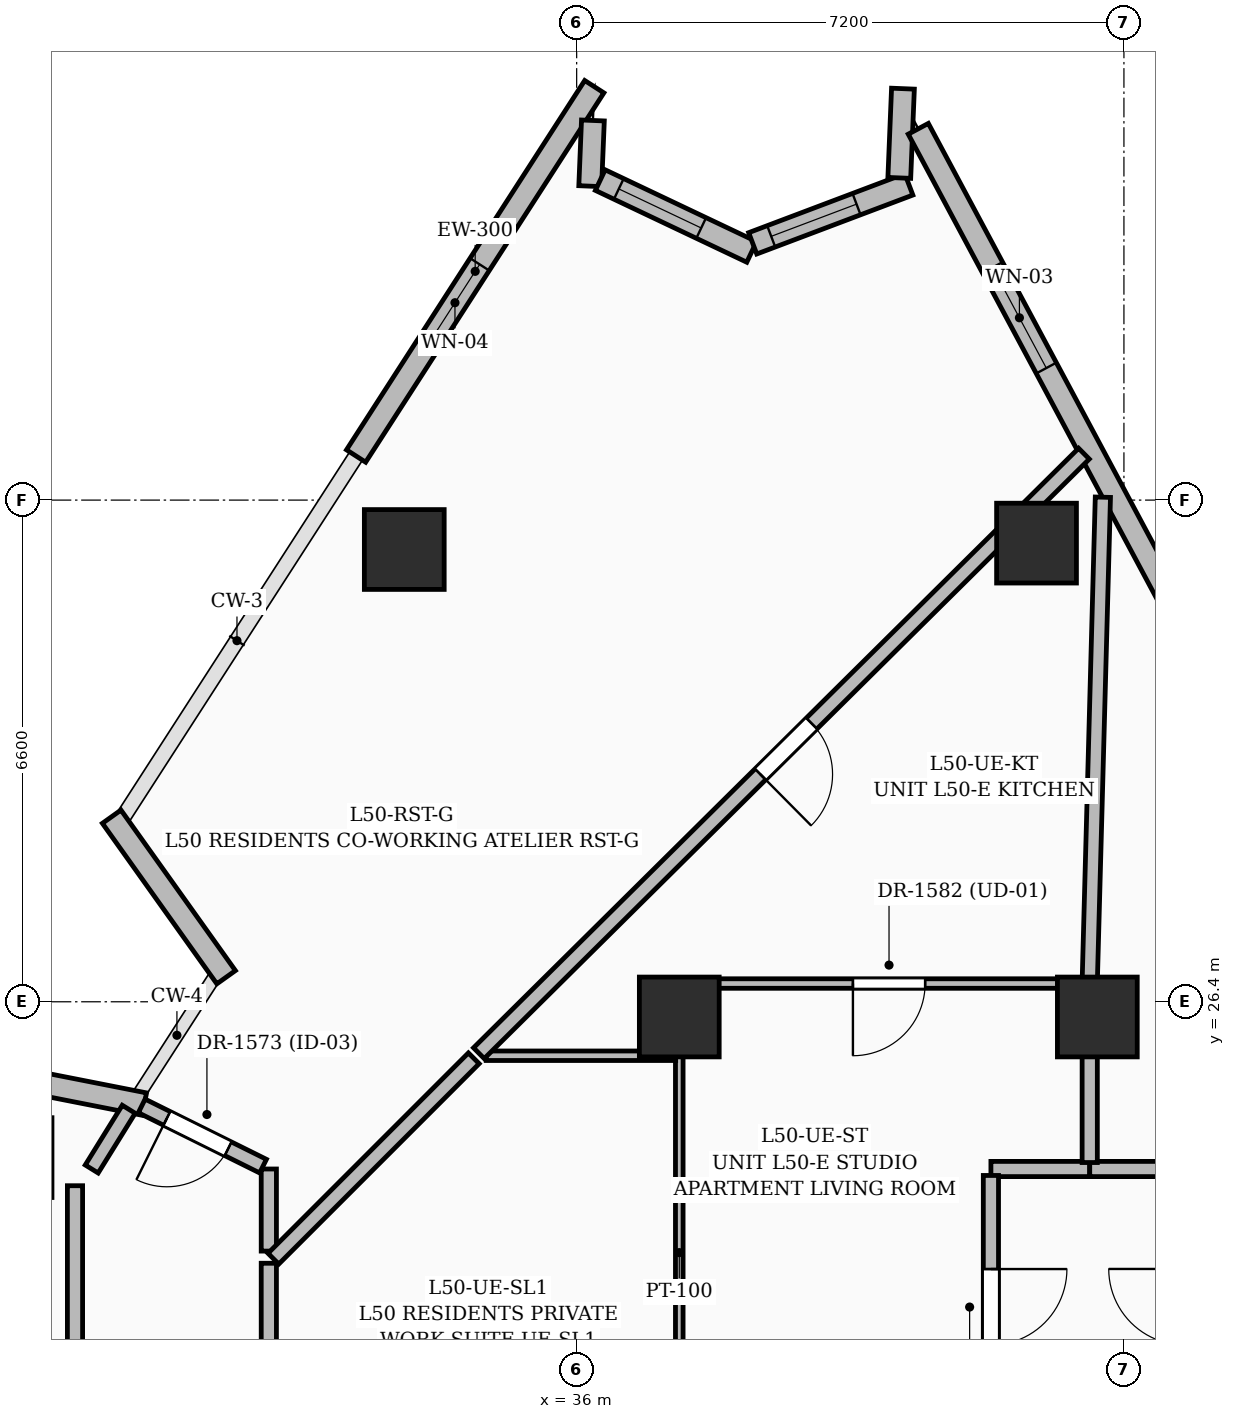
"""IFC4 building model, lengths in metres.
Left out: names, types, materials, properties, quantities, classifications, styles, units other than length and angle.
Written with IfcOpenShell. Run it as: python <this file> out.ifc"""

import sys

from ifc_helpers import new_model, si_unit, direction, frame, frame_2d, origin, origin_2d, place, context, subcontext, project, spatial, rectangle, extrude, element, fill, save


model = new_model("IFC4")
c1 = context("Model", 3, precision=1e-05, world=origin(), true_north=direction((0.0, 1.0)))
c2 = subcontext(c1, "Body", "Model", "MODEL_VIEW")
j1 = project(units=[si_unit("LENGTHUNIT", "METRE"), si_unit("PLANEANGLEUNIT", "RADIAN")], contexts=[c1])
p1 = place(None, origin())
s1 = spatial("IfcSite", under=j1, at=p1, CompositionType="ELEMENT")
p2 = place(p1, origin())
s2 = spatial("IfcBuilding", under=s1, at=p2, CompositionType="ELEMENT")
p3 = place(p2, frame((0.0, 0.0, 193.2)))
s3 = spatial("IfcBuildingStorey", under=s2, at=p3, CompositionType="ELEMENT", Elevation=193.2)
for number, where, z_axis, x_axis in (
    (1, (42.85, 26.2, 0.0), (0.0, 0.0, 1.0), (1.0, 0.0, 0.0)),
    (2, (37.35, 26.2, 0.0), (0.0, 0.0, 1.0), (1.0, 0.0, 0.0)),
    (3, (42.05, 32.434, 0.0), (0.0, 0.0, 1.0), (1.0, 0.0, 0.0)),
    (4, (33.732, 32.35, 0.0), (0.0, 0.0, 1.0), (1.0, 0.0, 0.0)),
):
    element("IfcColumn", number, at=place(p3, frame(where, z_axis=z_axis, x_axis=x_axis)), inside=s3, PredefinedType="COLUMN", context=c2, shape_type="SweptSolid", body=[
        extrude(rectangle(XDim=1.05, YDim=1.05, at=origin_2d()), origin(), (0.0, 0.0, 1.0), 3.6),
    ])
p4 = place(p3, frame((27.767, 25.555, 0.0), z_axis=(0.0, 0.0, 1.0), x_axis=(0.981183938234, -0.193075320412, 0.0)))
e5 = element("IfcWall", 5, at=p4, inside=s3, PredefinedType="SOLIDWALL", context=c2, shape_type="SweptSolid", body=[
    extrude(rectangle(XDim=2.595, YDim=0.3, at=frame_2d((1.297, 0.0))), origin(), (0.0, 0.0, 1.0), 2.525),
])
p5 = place(p3, frame((31.388, 26.723, 0.0), z_axis=(0.0, 0.0, 1.0), x_axis=(-0.580409797139, 0.814324546716, 0.0)))
e6 = element("IfcWall", 6, at=p5, inside=s3, PredefinedType="SOLIDWALL", context=c2, shape_type="SweptSolid", body=[
    extrude(rectangle(XDim=2.594, YDim=0.3, at=frame_2d((1.297, 0.0))), origin(), (0.0, 0.0, 1.0), 2.525),
])
p6 = place(p3, frame((33.098, 33.58, 0.0), z_axis=(0.0, 0.0, 1.0), x_axis=(0.542037422538, 0.840354349408, 0.0)))
e7 = element("IfcWall", 7, at=p6, inside=s3, PredefinedType="SOLIDWALL", context=c2, shape_type="SweptSolid", body=[
    extrude(rectangle(XDim=5.782, YDim=0.3, at=frame_2d((2.891, 0.0))), origin(), (0.0, 0.0, 1.0), 3.3),
])
p7 = place(p6, frame((1.8, 0.0, 0.8)))
e8 = element("IfcOpeningElement", 8, at=p7, cuts=e7, PredefinedType="OPENING", context=c2, shape_type="SweptSolid", body=[
    extrude(rectangle(XDim=1.2, YDim=1.8, at=frame_2d((0.6, 0.9))), frame((0.0, 0.16, 0.0), z_axis=(0.0, -1.0, 0.0), x_axis=(1.0, 0.0, 0.0)), (0.0, 0.0, 1.0), 0.32),
])
p8 = place(p3, frame((36.214, 37.994, 0.0), z_axis=(0.0, 0.0, 1.0), x_axis=(-0.040926134278, -0.999162174791, 0.0)))
e9 = element("IfcWall", 9, at=p8, inside=s3, PredefinedType="SOLIDWALL", context=c2, shape_type="SweptSolid", body=[
    extrude(rectangle(XDim=0.865, YDim=0.3, at=frame_2d((0.433, 0.0))), origin(), (0.0, 0.0, 1.0), 3.3),
])
p9 = place(p3, frame((36.311, 37.21, 0.0), z_axis=(0.0, 0.0, 1.0), x_axis=(0.903471604204, -0.428647944585, 0.0)))
e10 = element("IfcWall", 10, at=p9, inside=s3, PredefinedType="SOLIDWALL", context=c2, shape_type="SweptSolid", body=[
    extrude(rectangle(XDim=2.205, YDim=0.3, at=frame_2d((1.103, 0.0))), origin(), (0.0, 0.0, 1.0), 3.3),
])
p10 = place(p9, frame((0.27, 0.0, 0.8)))
e11 = element("IfcOpeningElement", 11, at=p10, cuts=e10, PredefinedType="OPENING", context=c2, shape_type="SweptSolid", body=[
    extrude(rectangle(XDim=1.2, YDim=1.8, at=frame_2d((0.6, 0.9))), frame((0.0, 0.16, 0.0), z_axis=(0.0, -1.0, 0.0), x_axis=(1.0, 0.0, 0.0)), (0.0, 0.0, 1.0), 0.32),
])
p11 = place(p3, frame((38.316, 36.378, 0.0), z_axis=(0.0, 0.0, 1.0), x_axis=(0.935503953589, 0.353316222129, 0.0)))
e12 = element("IfcWall", 12, at=p11, inside=s3, PredefinedType="SOLIDWALL", context=c2, shape_type="SweptSolid", body=[
    extrude(rectangle(XDim=2.195, YDim=0.3, at=frame_2d((1.098, 0.0))), origin(), (0.0, 0.0, 1.0), 3.3),
])
p12 = place(p11, frame((0.26, 0.0, 0.8)))
e13 = element("IfcOpeningElement", 13, at=p12, cuts=e12, PredefinedType="OPENING", context=c2, shape_type="SweptSolid", body=[
    extrude(rectangle(XDim=1.2, YDim=1.8, at=frame_2d((0.6, 0.9))), frame((0.0, 0.16, 0.0), z_axis=(0.0, -1.0, 0.0), x_axis=(1.0, 0.0, 0.0)), (0.0, 0.0, 1.0), 0.32),
])
p13 = place(p3, frame((40.245, 37.239, 0.0), z_axis=(0.0, 0.0, 1.0), x_axis=(0.040939027533, 0.999161646594, 0.0)))
e14 = element("IfcWall", 14, at=p13, inside=s3, PredefinedType="SOLIDWALL", context=c2, shape_type="SweptSolid", body=[
    extrude(rectangle(XDim=1.175, YDim=0.3, at=frame_2d((0.587, 0.0))), origin(), (0.0, 0.0, 1.0), 3.3),
])
p14 = place(p3, frame((40.495, 37.885, 0.0), z_axis=(0.0, 0.0, 1.0), x_axis=(0.471731834897, -0.88174206883, 0.0)))
e15 = element("IfcWall", 15, at=p14, inside=s3, PredefinedType="SOLIDWALL", context=c2, shape_type="SweptSolid", body=[
    extrude(rectangle(XDim=7.1, YDim=0.3, at=frame_2d((3.55, 0.0))), origin(), (0.0, 0.0, 1.0), 3.3),
])
p15 = place(p14, frame((2.07, 0.0, 0.6)))
e16 = element("IfcOpeningElement", 16, at=p15, cuts=e15, PredefinedType="OPENING", context=c2, shape_type="SweptSolid", body=[
    extrude(rectangle(XDim=1.5, YDim=2.1, at=frame_2d((0.75, 1.05))), frame((0.0, 0.16, 0.0), z_axis=(0.0, -1.0, 0.0), x_axis=(1.0, 0.0, 0.0)), (0.0, 0.0, 1.0), 0.32),
])
p16 = place(p3, frame((29.4, 23.98, 0.0), z_axis=(0.0, 0.0, 1.0), x_axis=(0.0, -1.0, 0.0)))
e17 = element("IfcWall", 17, at=p16, inside=s3, PredefinedType="PARTITIONING", context=c2, shape_type="SweptSolid", body=[
    extrude(rectangle(XDim=3.18, YDim=0.2, at=frame_2d((1.59, 0.0))), origin(), (0.0, 0.0, 1.0), 2.414),
])
p17 = place(p3, frame((30.107, 24.986, 0.0), z_axis=(0.0, 0.0, 1.0), x_axis=(-0.526481863985, -0.850186360097, 0.0)))
e18 = element("IfcWall", 18, at=p17, inside=s3, PredefinedType="PARTITIONING", context=c2, shape_type="SweptSolid", body=[
    extrude(rectangle(XDim=0.925, YDim=0.2, at=frame_2d((0.462, 0.0))), origin(), (0.0, 0.0, 1.0), 3.3),
])
p18 = place(p3, frame((42.75, 24.2, 0.0), z_axis=(0.0, 0.0, 1.0), x_axis=(-1.0, 0.0, 0.0)))
e19 = element("IfcWall", 19, at=p18, inside=s3, PredefinedType="PARTITIONING", context=c2, shape_type="SweptSolid", body=[
    extrude(rectangle(XDim=1.3, YDim=0.2, at=frame_2d((0.65, 0.0))), origin(), (0.0, 0.0, 1.0), 3.3),
])
p19 = place(p3, frame((41.45, 24.115, 0.0), z_axis=(0.0, 0.0, 1.0), x_axis=(0.0, -1.0, 0.0)))
e20 = element("IfcWall", 20, at=p19, inside=s3, PredefinedType="PARTITIONING", context=c2, shape_type="SweptSolid", body=[
    extrude(rectangle(XDim=3.665, YDim=0.2, at=frame_2d((1.833, 0.0))), origin(), (0.0, 0.0, 1.0), 3.3),
])
p20 = place(p19, frame((1.231, 0.0, 0.0)))
e21 = element("IfcOpeningElement", 21, at=p20, cuts=e20, PredefinedType="OPENING", context=c2, shape_type="SweptSolid", body=[
    extrude(rectangle(XDim=1.0, YDim=2.2, at=frame_2d((0.5, 1.1))), frame((0.0, 0.11, 0.0), z_axis=(0.0, -1.0, 0.0), x_axis=(1.0, 0.0, 0.0)), (0.0, 0.0, 1.0), 0.22),
])
p21 = place(p3, frame((31.95, 19.42, 0.0), z_axis=(0.0, 0.0, 1.0), x_axis=(0.0, 1.0, 0.0)))
e22 = element("IfcWall", 22, at=p21, inside=s3, PredefinedType="PARTITIONING", context=c2, shape_type="SweptSolid", body=[
    extrude(rectangle(XDim=3.54, YDim=0.2, at=frame_2d((1.77, 0.0))), origin(), (0.0, 0.0, 1.0), 2.414),
])
p22 = place(p3, frame((43.915, 24.2, 0.0), z_axis=(0.0, 0.0, 1.0), x_axis=(-1.0, 0.0, 0.0)))
e23 = element("IfcWall", 23, at=p22, inside=s3, PredefinedType="PARTITIONING", context=c2, shape_type="SweptSolid", body=[
    extrude(rectangle(XDim=1.165, YDim=0.2, at=frame_2d((0.583, 0.0))), origin(), (0.0, 0.0, 1.0), 2.386),
])
p23 = place(p3, frame((31.95, 23.12, 0.0), z_axis=(0.0, 0.0, 1.0), x_axis=(0.0, 1.0, 0.0)))
e24 = element("IfcWall", 24, at=p23, inside=s3, PredefinedType="PARTITIONING", context=c2, shape_type="SweptSolid", body=[
    extrude(rectangle(XDim=1.08, YDim=0.2, at=frame_2d((0.54, 0.0))), origin(), (0.0, 0.0, 1.0), 2.721),
])
p24 = place(p3, frame((31.874, 24.238, 0.0), z_axis=(0.0, 0.0, 1.0), x_axis=(-0.895738971374, 0.444580358497, 0.0)))
e25 = element("IfcWall", 25, at=p24, inside=s3, PredefinedType="PARTITIONING", context=c2, shape_type="SweptSolid", body=[
    extrude(rectangle(XDim=1.781, YDim=0.2, at=frame_2d((0.891, 0.0))), origin(), (0.0, 0.0, 1.0), 3.3),
])
p25 = place(p24, frame((0.513, 0.0, 0.0)))
e26 = element("IfcOpeningElement", 26, at=p25, cuts=e25, PredefinedType="OPENING", context=c2, shape_type="SweptSolid", body=[
    extrude(rectangle(XDim=0.9, YDim=2.1, at=frame_2d((0.45, 1.05))), frame((0.0, 0.11, 0.0), z_axis=(0.0, -1.0, 0.0), x_axis=(1.0, 0.0, 0.0)), (0.0, 0.0, 1.0), 0.22),
])
p26 = place(p3, frame((42.75, 26.64, 0.0), z_axis=(0.0, 0.0, 1.0), x_axis=(-1.0, 0.0, 0.0)))
e27 = element("IfcWall", 27, at=p26, inside=s3, PredefinedType="PARTITIONING", context=c2, shape_type="SweptSolid", body=[
    extrude(rectangle(XDim=5.4, YDim=0.125, at=frame_2d((2.7, 0.0))), origin(), (0.0, 0.0, 1.0), 3.3),
])
p27 = place(p26, frame((2.165, 0.0, 0.0)))
e28 = element("IfcOpeningElement", 28, at=p27, cuts=e27, PredefinedType="OPENING", context=c2, shape_type="SweptSolid", body=[
    extrude(rectangle(XDim=0.95, YDim=2.2, at=frame_2d((0.475, 1.1))), frame((0.0, 0.072, 0.0), z_axis=(0.0, -1.0, 0.0), x_axis=(1.0, 0.0, 0.0)), (0.0, 0.0, 1.0), 0.145),
])
p28 = place(p3, frame((37.35, 26.593, 0.0), z_axis=(0.0, 0.0, 1.0), x_axis=(0.0, -1.0, 0.0)))
e29 = element("IfcWall", 29, at=p28, inside=s3, PredefinedType="PARTITIONING", context=c2, shape_type="SweptSolid", body=[
    extrude(rectangle(XDim=0.903, YDim=0.125, at=frame_2d((0.451, 0.0))), origin(), (0.0, 0.0, 1.0), 3.3),
])
p29 = place(p3, frame((37.35, 25.69, 0.0), z_axis=(0.0, 0.0, 1.0), x_axis=(0.0, -1.0, 0.0)))
e30 = element("IfcWall", 30, at=p29, inside=s3, PredefinedType="PARTITIONING", context=c2, shape_type="SweptSolid", body=[
    extrude(rectangle(XDim=5.18, YDim=0.1, at=frame_2d((2.59, 0.0))), origin(), (0.0, 0.0, 1.0), 3.3),
])
p30 = place(p3, frame((42.75, 24.285, 0.0), z_axis=(0.0, 0.0, 1.0), x_axis=(0.0, 1.0, 0.0)))
e31 = element("IfcWall", 31, at=p30, inside=s3, PredefinedType="PARTITIONING", context=c2, shape_type="SweptSolid", body=[
    extrude(rectangle(XDim=2.308, YDim=0.2, at=frame_2d((1.154, 0.0))), origin(), (0.0, 0.0, 1.0), 3.3),
])
p31 = place(p3, frame((34.81, 25.69, 0.0), z_axis=(0.0, 0.0, 1.0), x_axis=(1.0, 0.0, 0.0)))
e32 = element("IfcWall", 32, at=p31, inside=s3, PredefinedType="PARTITIONING", context=c2, shape_type="SweptSolid", body=[
    extrude(rectangle(XDim=2.492, YDim=0.125, at=frame_2d((1.246, 0.0))), origin(), (0.0, 0.0, 1.0), 2.386),
])
p32 = place(p3, frame((42.751, 26.688, 0.0), z_axis=(0.0, 0.0, 1.0), x_axis=(0.027092926653, 0.999632919289, 0.0)))
e33 = element("IfcWall", 33, at=p32, inside=s3, PredefinedType="PARTITIONING", context=c2, shape_type="SweptSolid", body=[
    extrude(rectangle(XDim=6.353, YDim=0.2, at=frame_2d((3.177, 0.0))), origin(), (0.0, 0.0, 1.0), 2.414),
])
p33 = place(p3, frame((42.674, 33.611, 0.0), z_axis=(0.0, 0.0, 1.0), x_axis=(-0.710345403642, -0.703853257096, 0.0)))
e34 = element("IfcWall", 34, at=p33, inside=s3, PredefinedType="PARTITIONING", context=c2, shape_type="SweptSolid", body=[
    extrude(rectangle(XDim=11.207, YDim=0.2, at=frame_2d((5.603, 0.0))), origin(), (0.0, 0.0, 1.0), 2.414),
])
p34 = place(p33, frame((5.043, 0.0, 0.0)))
e35 = element("IfcOpeningElement", 35, at=p34, cuts=e34, PredefinedType="OPENING", context=c2, shape_type="SweptSolid", body=[
    extrude(rectangle(XDim=0.95, YDim=2.2, at=frame_2d((0.475, 1.1))), frame((0.0, 0.11, 0.0), z_axis=(0.0, -1.0, 0.0), x_axis=(1.0, 0.0, 0.0)), (0.0, 0.0, 1.0), 0.22),
])
p35 = place(p3, frame((34.646, 25.656, 0.0), z_axis=(0.0, 0.0, 1.0), x_axis=(-0.707106781187, -0.707106781187, 0.0)))
e36 = element("IfcWall", 36, at=p35, inside=s3, PredefinedType="PARTITIONING", context=c2, shape_type="SweptSolid", body=[
    extrude(rectangle(XDim=3.729, YDim=0.2, at=frame_2d((1.864, 0.0))), origin(), (0.0, 0.0, 1.0), 2.721),
])
p36 = place(p7, origin())
e37 = element("IfcWindow", 37, at=p36, inside=s3, PartitioningType="SINGLE_PANEL", PredefinedType="WINDOW", context=c2, shape_type="SweptSolid", body=[
    extrude(rectangle(XDim=1.2, YDim=1.8, at=frame_2d((0.6, 0.9))), frame((0.0, 0.03, 0.0), z_axis=(0.0, -1.0, 0.0), x_axis=(1.0, 0.0, 0.0)), (0.0, 0.0, 1.0), 0.06),
])
fill(e8, e37)
p37 = place(p10, origin())
e38 = element("IfcWindow", 38, at=p37, inside=s3, PartitioningType="SINGLE_PANEL", PredefinedType="WINDOW", context=c2, shape_type="SweptSolid", body=[
    extrude(rectangle(XDim=1.2, YDim=1.8, at=frame_2d((0.6, 0.9))), frame((0.0, 0.03, 0.0), z_axis=(0.0, -1.0, 0.0), x_axis=(1.0, 0.0, 0.0)), (0.0, 0.0, 1.0), 0.06),
])
fill(e11, e38)
p38 = place(p12, origin())
e39 = element("IfcWindow", 39, at=p38, inside=s3, PartitioningType="SINGLE_PANEL", PredefinedType="WINDOW", context=c2, shape_type="SweptSolid", body=[
    extrude(rectangle(XDim=1.2, YDim=1.8, at=frame_2d((0.6, 0.9))), frame((0.0, 0.03, 0.0), z_axis=(0.0, -1.0, 0.0), x_axis=(1.0, 0.0, 0.0)), (0.0, 0.0, 1.0), 0.06),
])
fill(e13, e39)
p39 = place(p15, origin())
e40 = element("IfcWindow", 40, at=p39, inside=s3, PartitioningType="SINGLE_PANEL", PredefinedType="WINDOW", context=c2, shape_type="SweptSolid", body=[
    extrude(rectangle(XDim=1.5, YDim=2.1, at=frame_2d((0.75, 1.05))), frame((0.0, 0.03, 0.0), z_axis=(0.0, -1.0, 0.0), x_axis=(1.0, 0.0, 0.0)), (0.0, 0.0, 1.0), 0.06),
])
fill(e16, e40)
p40 = place(p25, origin())
e41 = element("IfcDoor", 41, at=p40, inside=s3, OperationType="SINGLE_SWING_RIGHT", PredefinedType="DOOR", context=c2, shape_type="SweptSolid", body=[
    extrude(rectangle(XDim=0.9, YDim=2.1, at=frame_2d((0.45, 1.05))), frame((0.0, 0.025, 0.0), z_axis=(0.0, -1.0, 0.0), x_axis=(1.0, 0.0, 0.0)), (0.0, 0.0, 1.0), 0.05),
])
fill(e26, e41)
p41 = place(p20, origin())
e42 = element("IfcDoor", 42, at=p41, inside=s3, OperationType="SINGLE_SWING_LEFT", PredefinedType="DOOR", context=c2, shape_type="SweptSolid", body=[
    extrude(rectangle(XDim=1.0, YDim=2.2, at=frame_2d((0.5, 1.1))), frame((0.0, 0.025, 0.0), z_axis=(0.0, -1.0, 0.0), x_axis=(1.0, 0.0, 0.0)), (0.0, 0.0, 1.0), 0.05),
])
fill(e21, e42)
p42 = place(p27, origin())
e43 = element("IfcDoor", 43, at=p42, inside=s3, OperationType="SINGLE_SWING_RIGHT", PredefinedType="DOOR", context=c2, shape_type="SweptSolid", body=[
    extrude(rectangle(XDim=0.95, YDim=2.2, at=frame_2d((0.475, 1.1))), frame((0.0, 0.025, 0.0), z_axis=(0.0, -1.0, 0.0), x_axis=(1.0, 0.0, 0.0)), (0.0, 0.0, 1.0), 0.05),
])
fill(e28, e43)
p43 = place(p34, origin())
e44 = element("IfcDoor", 44, at=p43, inside=s3, OperationType="SINGLE_SWING_RIGHT", PredefinedType="DOOR", context=c2, shape_type="SweptSolid", body=[
    extrude(rectangle(XDim=0.95, YDim=2.2, at=frame_2d((0.475, 1.1))), frame((0.0, 0.025, 0.0), z_axis=(0.0, -1.0, 0.0), x_axis=(1.0, 0.0, 0.0)), (0.0, 0.0, 1.0), 0.05),
])
fill(e35, e44)
save(model, sys.argv[1])
